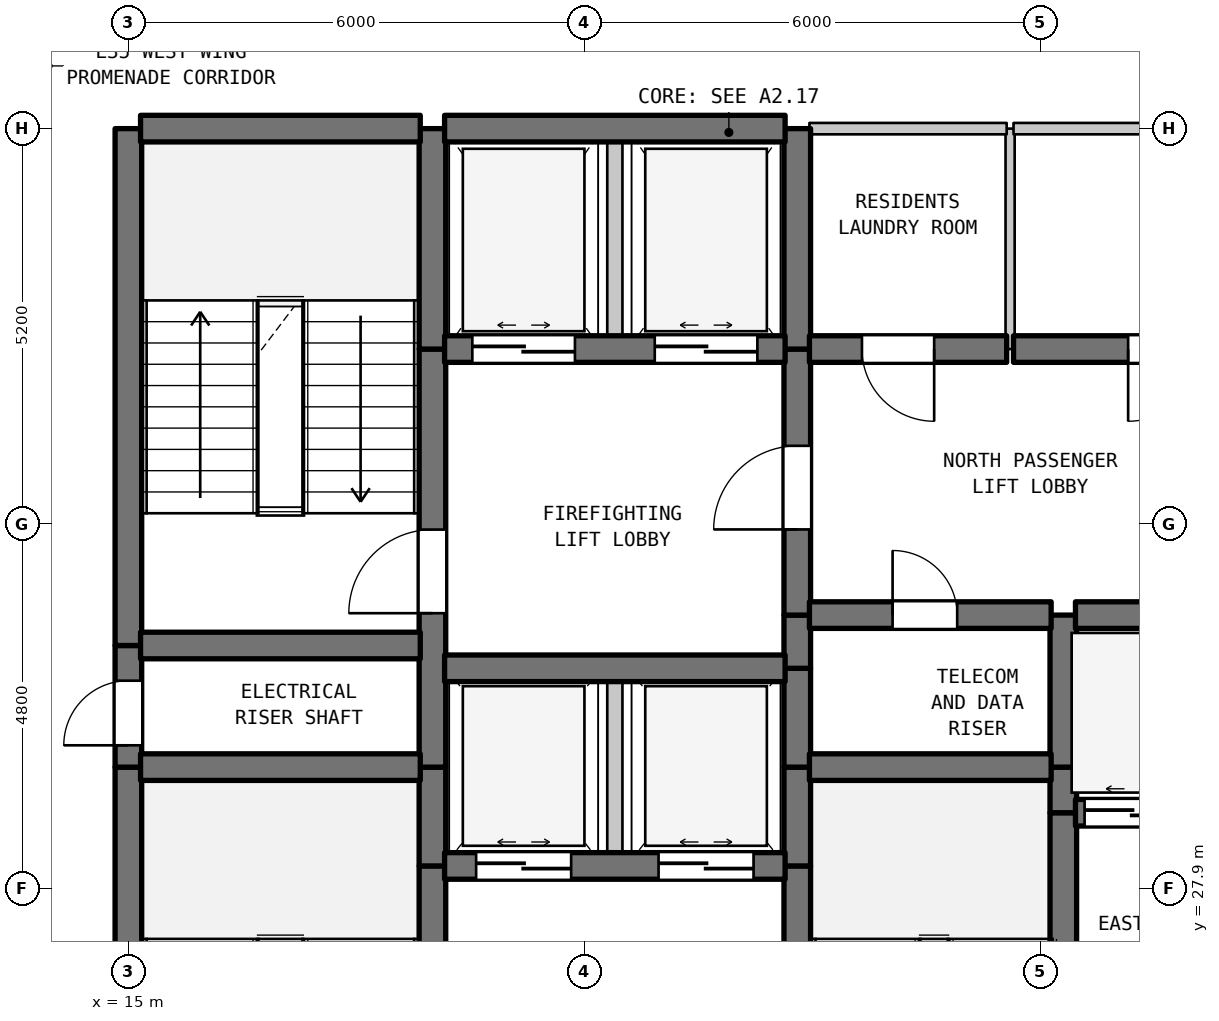
"""IFC4 building model, lengths in metres.
Left out: names, types, materials, properties, quantities, classifications, styles, units other than length and angle.
Written with IfcOpenShell. Run it as: python <this file> out.ifc"""

import sys

from ifc_helpers import new_model, si_unit, direction, frame, frame_2d, origin, place, context, subcontext, project, spatial, rectangle, extrude, element, fill, save


model = new_model("IFC4")
c1 = context("Model", 3, precision=1e-05, world=origin(), true_north=direction((0.0, 1.0)))
c2 = subcontext(c1, "Body", "Model", "MODEL_VIEW")
j1 = project(units=[si_unit("LENGTHUNIT", "METRE"), si_unit("PLANEANGLEUNIT", "RADIAN")], contexts=[c1])
p1 = place(None, origin())
s1 = spatial("IfcSite", under=j1, at=p1, CompositionType="ELEMENT")
p2 = place(p1, origin())
s2 = spatial("IfcBuilding", under=s1, at=p2, CompositionType="ELEMENT")
p3 = place(p2, frame((0.0, 0.0, 144.6)))
s3 = spatial("IfcBuildingStorey", under=s2, at=p3, CompositionType="ELEMENT", Elevation=144.6)
p4 = place(p3, frame((15.0, 22.7, 0.0), z_axis=(0.0, 0.0, 1.0), x_axis=(0.0, 1.0, 0.0)))
e1 = element("IfcWall", 1, at=p4, inside=s3, PredefinedType="SHEAR", context=c2, shape_type="SweptSolid", body=[
    extrude(rectangle(XDim=6.8, YDim=0.35, at=frame_2d((3.4, 0.0))), origin(), (0.0, 0.0, 1.0), 3.385),
])
p5 = place(p3, frame((15.0, 29.5, 0.0), z_axis=(0.0, 0.0, 1.0), x_axis=(0.0, 1.0, 0.0)))
e2 = element("IfcWall", 2, at=p5, inside=s3, PredefinedType="SHEAR", context=c2, shape_type="SweptSolid", body=[
    extrude(rectangle(XDim=1.6, YDim=0.35, at=frame_2d((0.8, 0.0))), origin(), (0.0, 0.0, 1.0), 3.385),
])
p6 = place(p5, frame((0.287, 0.0, 0.0)))
e3 = element("IfcOpeningElement", 3, at=p6, cuts=e2, PredefinedType="OPENING", context=c2, shape_type="SweptSolid", body=[
    extrude(rectangle(XDim=0.85, YDim=2.1, at=frame_2d((0.425, 1.05))), frame((0.0, 0.185, 0.0), z_axis=(0.0, -1.0, 0.0), x_axis=(1.0, 0.0, 0.0)), (0.0, 0.0, 1.0), 0.37),
])
p7 = place(p3, frame((15.0, 31.1, 0.0), z_axis=(0.0, 0.0, 1.0), x_axis=(0.0, 1.0, 0.0)))
e4 = element("IfcWall", 4, at=p7, inside=s3, PredefinedType="SHEAR", context=c2, shape_type="SweptSolid", body=[
    extrude(rectangle(XDim=6.8, YDim=0.35, at=frame_2d((3.4, 0.0))), origin(), (0.0, 0.0, 1.0), 3.385),
])
p8 = place(p3, frame((19.0, 22.7, 0.0), z_axis=(0.0, 0.0, 1.0), x_axis=(0.0, 1.0, 0.0)))
e5 = element("IfcWall", 5, at=p8, inside=s3, PredefinedType="SHEAR", context=c2, shape_type="SweptSolid", body=[
    extrude(rectangle(XDim=5.5, YDim=0.35, at=frame_2d((2.75, 0.0))), origin(), (0.0, 0.0, 1.0), 3.385),
])
p9 = place(p8, frame((0.631, 0.0, 0.0)))
e6 = element("IfcOpeningElement", 6, at=p9, cuts=e5, PredefinedType="OPENING", context=c2, shape_type="SweptSolid", body=[
    extrude(rectangle(XDim=1.1, YDim=2.15, at=frame_2d((0.55, 1.075))), frame((0.0, 0.185, 0.0), z_axis=(0.0, -1.0, 0.0), x_axis=(1.0, 0.0, 0.0)), (0.0, 0.0, 1.0), 0.37),
])
p10 = place(p3, frame((19.0, 28.2, 0.0), z_axis=(0.0, 0.0, 1.0), x_axis=(0.0, 1.0, 0.0)))
e7 = element("IfcWall", 7, at=p10, inside=s3, PredefinedType="SHEAR", context=c2, shape_type="SweptSolid", body=[
    extrude(rectangle(XDim=1.3, YDim=0.35, at=frame_2d((0.65, 0.0))), origin(), (0.0, 0.0, 1.0), 3.385),
])
p11 = place(p3, frame((19.0, 29.5, 0.0), z_axis=(0.0, 0.0, 1.0), x_axis=(0.0, 1.0, 0.0)))
e8 = element("IfcWall", 8, at=p11, inside=s3, PredefinedType="SHEAR", context=c2, shape_type="SweptSolid", body=[
    extrude(rectangle(XDim=5.5, YDim=0.35, at=frame_2d((2.75, 0.0))), origin(), (0.0, 0.0, 1.0), 3.385),
])
p12 = place(p11, frame((2.025, 0.0, 0.0)))
e9 = element("IfcOpeningElement", 9, at=p12, cuts=e8, PredefinedType="OPENING", context=c2, shape_type="SweptSolid", body=[
    extrude(rectangle(XDim=1.1, YDim=2.15, at=frame_2d((0.55, 1.075))), frame((0.0, 0.185, 0.0), z_axis=(0.0, -1.0, 0.0), x_axis=(1.0, 0.0, 0.0)), (0.0, 0.0, 1.0), 0.37),
])
p13 = place(p3, frame((19.0, 35.0, 0.0), z_axis=(0.0, 0.0, 1.0), x_axis=(0.0, 1.0, 0.0)))
e10 = element("IfcWall", 10, at=p13, inside=s3, PredefinedType="SHEAR", context=c2, shape_type="SweptSolid", body=[
    extrude(rectangle(XDim=2.9, YDim=0.35, at=frame_2d((1.45, 0.0))), origin(), (0.0, 0.0, 1.0), 3.385),
])
p14 = place(p3, frame((21.4, 28.2, 0.0), z_axis=(0.0, 0.0, 1.0), x_axis=(0.0, 1.0, 0.0)))
e11 = element("IfcWall", 11, at=p14, inside=s3, PredefinedType="STANDARD", context=c2, shape_type="SweptSolid", body=[
    extrude(rectangle(XDim=2.6, YDim=0.2, at=frame_2d((1.3, 0.0))), origin(), (0.0, 0.0, 1.0), 3.385),
])
p15 = place(p3, frame((21.4, 35.0, 0.0), z_axis=(0.0, 0.0, 1.0), x_axis=(0.0, 1.0, 0.0)))
e12 = element("IfcWall", 12, at=p15, inside=s3, PredefinedType="STANDARD", context=c2, shape_type="SweptSolid", body=[
    extrude(rectangle(XDim=2.9, YDim=0.2, at=frame_2d((1.45, 0.0))), origin(), (0.0, 0.0, 1.0), 3.385),
])
p16 = place(p3, frame((23.8, 22.7, 0.0), z_axis=(0.0, 0.0, 1.0), x_axis=(0.0, 1.0, 0.0)))
e13 = element("IfcWall", 13, at=p16, inside=s3, PredefinedType="SHEAR", context=c2, shape_type="SweptSolid", body=[
    extrude(rectangle(XDim=5.5, YDim=0.35, at=frame_2d((2.75, 0.0))), origin(), (0.0, 0.0, 1.0), 3.385),
])
p17 = place(p16, frame((0.235, 0.0, 0.0)))
e14 = element("IfcOpeningElement", 14, at=p17, cuts=e13, PredefinedType="OPENING", context=c2, shape_type="SweptSolid", body=[
    extrude(rectangle(XDim=1.1, YDim=2.15, at=frame_2d((0.55, 1.075))), frame((0.0, 0.185, 0.0), z_axis=(0.0, -1.0, 0.0), x_axis=(1.0, 0.0, 0.0)), (0.0, 0.0, 1.0), 0.37),
])
for number, where, z_axis, x_axis in (
    (15, (23.8, 28.2, 0.0), (0.0, 0.0, 1.0), (0.0, 1.0, 0.0)),
    (16, (23.8, 29.5, 0.0), (0.0, 0.0, 1.0), (0.0, 1.0, 0.0)),
):
    element("IfcWall", number, at=place(p3, frame(where, z_axis=z_axis, x_axis=x_axis)), inside=s3, PredefinedType="SHEAR", context=c2, shape_type="SweptSolid", body=[
        extrude(rectangle(XDim=1.3, YDim=0.35, at=frame_2d((0.65, 0.0))), origin(), (0.0, 0.0, 1.0), 3.385),
    ])
p18 = place(p3, frame((23.8, 30.8, 0.0), z_axis=(0.0, 0.0, 1.0), x_axis=(0.0, 1.0, 0.0)))
e17 = element("IfcWall", 17, at=p18, inside=s3, PredefinedType="SHEAR", context=c2, shape_type="SweptSolid", body=[
    extrude(rectangle(XDim=0.7, YDim=0.35, at=frame_2d((0.35, 0.0))), origin(), (0.0, 0.0, 1.0), 3.385),
])
p19 = place(p3, frame((23.8, 31.5, 0.0), z_axis=(0.0, 0.0, 1.0), x_axis=(0.0, 1.0, 0.0)))
e18 = element("IfcWall", 18, at=p19, inside=s3, PredefinedType="SHEAR", context=c2, shape_type="SweptSolid", body=[
    extrude(rectangle(XDim=3.5, YDim=0.35, at=frame_2d((1.75, 0.0))), origin(), (0.0, 0.0, 1.0), 3.385),
])
p20 = place(p19, frame((1.127, 0.0, 0.0)))
e19 = element("IfcOpeningElement", 19, at=p20, cuts=e18, PredefinedType="OPENING", context=c2, shape_type="SweptSolid", body=[
    extrude(rectangle(XDim=1.1, YDim=2.15, at=frame_2d((0.55, 1.075))), frame((0.0, 0.185, 0.0), z_axis=(0.0, -1.0, 0.0), x_axis=(1.0, 0.0, 0.0)), (0.0, 0.0, 1.0), 0.37),
])
p21 = place(p3, frame((23.8, 35.0, 0.0), z_axis=(0.0, 0.0, 1.0), x_axis=(0.0, 1.0, 0.0)))
e20 = element("IfcWall", 20, at=p21, inside=s3, PredefinedType="SHEAR", context=c2, shape_type="SweptSolid", body=[
    extrude(rectangle(XDim=2.9, YDim=0.35, at=frame_2d((1.45, 0.0))), origin(), (0.0, 0.0, 1.0), 3.385),
])
p22 = place(p3, frame((26.6, 35.0, 0.0), z_axis=(0.0, 0.0, 1.0), x_axis=(0.0, 1.0, 0.0)))
e21 = element("IfcWall", 21, at=p22, inside=s3, PredefinedType="PARTITIONING", context=c2, shape_type="SweptSolid", body=[
    extrude(rectangle(XDim=2.9, YDim=0.12, at=frame_2d((1.45, 0.0))), origin(), (0.0, 0.0, 1.0), 3.385),
])
p23 = place(p3, frame((27.3, 25.6, 0.0), z_axis=(0.0, 0.0, 1.0), x_axis=(0.0, 1.0, 0.0)))
e22 = element("IfcWall", 22, at=p23, inside=s3, PredefinedType="SHEAR", context=c2, shape_type="SweptSolid", body=[
    extrude(rectangle(XDim=3.3, YDim=0.35, at=frame_2d((1.65, 0.0))), origin(), (0.0, 0.0, 1.0), 3.385),
])
p24 = place(p3, frame((27.3, 28.9, 0.0), z_axis=(0.0, 0.0, 1.0), x_axis=(0.0, 1.0, 0.0)))
e23 = element("IfcWall", 23, at=p24, inside=s3, PredefinedType="SHEAR", context=c2, shape_type="SweptSolid", body=[
    extrude(rectangle(XDim=0.6, YDim=0.35, at=frame_2d((0.3, 0.0))), origin(), (0.0, 0.0, 1.0), 3.385),
])
p25 = place(p3, frame((27.3, 29.5, 0.0), z_axis=(0.0, 0.0, 1.0), x_axis=(0.0, 1.0, 0.0)))
e24 = element("IfcWall", 24, at=p25, inside=s3, PredefinedType="SHEAR", context=c2, shape_type="SweptSolid", body=[
    extrude(rectangle(XDim=2.0, YDim=0.35, at=frame_2d((1.0, 0.0))), origin(), (0.0, 0.0, 1.0), 3.385),
])
p26 = place(p3, frame((19.16, 28.2, 0.0), z_axis=(0.0, 0.0, 1.0), x_axis=(1.0, 0.0, 0.0)))
e25 = element("IfcWall", 25, at=p26, inside=s3, PredefinedType="SHEAR", context=c2, shape_type="SweptSolid", body=[
    extrude(rectangle(XDim=4.48, YDim=0.35, at=frame_2d((2.24, 0.0))), origin(), (0.0, 0.0, 1.0), 3.385),
])
p27 = place(p26, frame((0.415, 0.0, 0.0)))
e26 = element("IfcOpeningElement", 26, at=p27, cuts=e25, PredefinedType="OPENING", context=c2, shape_type="SweptSolid", body=[
    extrude(rectangle(XDim=1.25, YDim=2.2, at=frame_2d((0.625, 1.1))), frame((0.0, 0.185, 0.0), z_axis=(0.0, -1.0, 0.0), x_axis=(1.0, 0.0, 0.0)), (0.0, 0.0, 1.0), 0.37),
])
p28 = place(p26, frame((2.815, 0.0, 0.0)))
e27 = element("IfcOpeningElement", 27, at=p28, cuts=e25, PredefinedType="OPENING", context=c2, shape_type="SweptSolid", body=[
    extrude(rectangle(XDim=1.25, YDim=2.2, at=frame_2d((0.625, 1.1))), frame((0.0, 0.185, 0.0), z_axis=(0.0, -1.0, 0.0), x_axis=(1.0, 0.0, 0.0)), (0.0, 0.0, 1.0), 0.37),
])
p29 = place(p3, frame((27.46, 28.9, 0.0), z_axis=(0.0, 0.0, 1.0), x_axis=(1.0, 0.0, 0.0)))
e28 = element("IfcWall", 28, at=p29, inside=s3, PredefinedType="SHEAR", context=c2, shape_type="SweptSolid", body=[
    extrude(rectangle(XDim=3.18, YDim=0.35, at=frame_2d((1.59, 0.0))), origin(), (0.0, 0.0, 1.0), 3.385),
])
p30 = place(p29, frame((0.12, 0.0, 0.0)))
e29 = element("IfcOpeningElement", 29, at=p30, cuts=e28, PredefinedType="OPENING", context=c2, shape_type="SweptSolid", body=[
    extrude(rectangle(XDim=1.25, YDim=2.2, at=frame_2d((0.625, 1.1))), frame((0.0, 0.185, 0.0), z_axis=(0.0, -1.0, 0.0), x_axis=(1.0, 0.0, 0.0)), (0.0, 0.0, 1.0), 0.37),
])
p31 = place(p29, frame((1.81, 0.0, 0.0)))
e30 = element("IfcOpeningElement", 30, at=p31, cuts=e28, PredefinedType="OPENING", context=c2, shape_type="SweptSolid", body=[
    extrude(rectangle(XDim=1.25, YDim=2.2, at=frame_2d((0.625, 1.1))), frame((0.0, 0.185, 0.0), z_axis=(0.0, -1.0, 0.0), x_axis=(1.0, 0.0, 0.0)), (0.0, 0.0, 1.0), 0.37),
])
p32 = place(p3, frame((15.16, 29.5, 0.0), z_axis=(0.0, 0.0, 1.0), x_axis=(1.0, 0.0, 0.0)))
e31 = element("IfcWall", 31, at=p32, inside=s3, PredefinedType="SHEAR", context=c2, shape_type="SweptSolid", body=[
    extrude(rectangle(XDim=3.68, YDim=0.35, at=frame_2d((1.84, 0.0))), origin(), (0.0, 0.0, 1.0), 3.385),
])
p33 = place(p3, frame((23.96, 29.5, 0.0), z_axis=(0.0, 0.0, 1.0), x_axis=(1.0, 0.0, 0.0)))
e32 = element("IfcWall", 32, at=p33, inside=s3, PredefinedType="SHEAR", context=c2, shape_type="SweptSolid", body=[
    extrude(rectangle(XDim=3.18, YDim=0.35, at=frame_2d((1.59, 0.0))), origin(), (0.0, 0.0, 1.0), 3.385),
])
p34 = place(p3, frame((19.16, 30.8, 0.0), z_axis=(0.0, 0.0, 1.0), x_axis=(1.0, 0.0, 0.0)))
e33 = element("IfcWall", 33, at=p34, inside=s3, PredefinedType="SHEAR", context=c2, shape_type="SweptSolid", body=[
    extrude(rectangle(XDim=4.48, YDim=0.35, at=frame_2d((2.24, 0.0))), origin(), (0.0, 0.0, 1.0), 3.385),
])
p35 = place(p3, frame((15.16, 31.1, 0.0), z_axis=(0.0, 0.0, 1.0), x_axis=(1.0, 0.0, 0.0)))
e34 = element("IfcWall", 34, at=p35, inside=s3, PredefinedType="SHEAR", context=c2, shape_type="SweptSolid", body=[
    extrude(rectangle(XDim=3.68, YDim=0.35, at=frame_2d((1.84, 0.0))), origin(), (0.0, 0.0, 1.0), 3.385),
])
p36 = place(p3, frame((23.96, 31.5, 0.0), z_axis=(0.0, 0.0, 1.0), x_axis=(1.0, 0.0, 0.0)))
e35 = element("IfcWall", 35, at=p36, inside=s3, PredefinedType="SHEAR", context=c2, shape_type="SweptSolid", body=[
    extrude(rectangle(XDim=3.18, YDim=0.35, at=frame_2d((1.59, 0.0))), origin(), (0.0, 0.0, 1.0), 3.385),
])
p37 = place(p36, frame((1.094, 0.0, 0.0)))
e36 = element("IfcOpeningElement", 36, at=p37, cuts=e35, PredefinedType="OPENING", context=c2, shape_type="SweptSolid", body=[
    extrude(rectangle(XDim=0.85, YDim=2.1, at=frame_2d((0.425, 1.05))), frame((0.0, 0.185, 0.0), z_axis=(0.0, -1.0, 0.0), x_axis=(1.0, 0.0, 0.0)), (0.0, 0.0, 1.0), 0.37),
])
p38 = place(p3, frame((27.46, 31.5, 0.0), z_axis=(0.0, 0.0, 1.0), x_axis=(1.0, 0.0, 0.0)))
e37 = element("IfcWall", 37, at=p38, inside=s3, PredefinedType="SHEAR", context=c2, shape_type="SweptSolid", body=[
    extrude(rectangle(XDim=3.18, YDim=0.35, at=frame_2d((1.59, 0.0))), origin(), (0.0, 0.0, 1.0), 3.385),
])
p39 = place(p3, frame((19.16, 35.0, 0.0), z_axis=(0.0, 0.0, 1.0), x_axis=(1.0, 0.0, 0.0)))
e38 = element("IfcWall", 38, at=p39, inside=s3, PredefinedType="SHEAR", context=c2, shape_type="SweptSolid", body=[
    extrude(rectangle(XDim=4.48, YDim=0.35, at=frame_2d((2.24, 0.0))), origin(), (0.0, 0.0, 1.0), 3.385),
])
p40 = place(p39, frame((0.365, 0.0, 0.0)))
e39 = element("IfcOpeningElement", 39, at=p40, cuts=e38, PredefinedType="OPENING", context=c2, shape_type="SweptSolid", body=[
    extrude(rectangle(XDim=1.35, YDim=2.2, at=frame_2d((0.675, 1.1))), frame((0.0, 0.185, 0.0), z_axis=(0.0, -1.0, 0.0), x_axis=(1.0, 0.0, 0.0)), (0.0, 0.0, 1.0), 0.37),
])
p41 = place(p39, frame((2.765, 0.0, 0.0)))
e40 = element("IfcOpeningElement", 40, at=p41, cuts=e38, PredefinedType="OPENING", context=c2, shape_type="SweptSolid", body=[
    extrude(rectangle(XDim=1.35, YDim=2.2, at=frame_2d((0.675, 1.1))), frame((0.0, 0.185, 0.0), z_axis=(0.0, -1.0, 0.0), x_axis=(1.0, 0.0, 0.0)), (0.0, 0.0, 1.0), 0.37),
])
p42 = place(p3, frame((23.96, 35.0, 0.0), z_axis=(0.0, 0.0, 1.0), x_axis=(1.0, 0.0, 0.0)))
e41 = element("IfcWall", 41, at=p42, inside=s3, PredefinedType="SHEAR", context=c2, shape_type="SweptSolid", body=[
    extrude(rectangle(XDim=2.595, YDim=0.35, at=frame_2d((1.297, 0.0))), origin(), (0.0, 0.0, 1.0), 3.385),
])
p43 = place(p42, frame((0.691, 0.0, 0.0)))
e42 = element("IfcOpeningElement", 42, at=p43, cuts=e41, PredefinedType="OPENING", context=c2, shape_type="SweptSolid", body=[
    extrude(rectangle(XDim=0.95, YDim=2.15, at=frame_2d((0.475, 1.075))), frame((0.0, 0.185, 0.0), z_axis=(0.0, -1.0, 0.0), x_axis=(1.0, 0.0, 0.0)), (0.0, 0.0, 1.0), 0.37),
])
p44 = place(p3, frame((26.645, 35.0, 0.0), z_axis=(0.0, 0.0, 1.0), x_axis=(1.0, 0.0, 0.0)))
e43 = element("IfcWall", 43, at=p44, inside=s3, PredefinedType="SHEAR", context=c2, shape_type="SweptSolid", body=[
    extrude(rectangle(XDim=3.995, YDim=0.35, at=frame_2d((1.998, 0.0))), origin(), (0.0, 0.0, 1.0), 3.385),
])
p45 = place(p44, frame((1.508, 0.0, 0.0)))
e44 = element("IfcOpeningElement", 44, at=p45, cuts=e43, PredefinedType="OPENING", context=c2, shape_type="SweptSolid", body=[
    extrude(rectangle(XDim=0.95, YDim=2.15, at=frame_2d((0.475, 1.075))), frame((0.0, 0.185, 0.0), z_axis=(0.0, -1.0, 0.0), x_axis=(1.0, 0.0, 0.0)), (0.0, 0.0, 1.0), 0.37),
])
p46 = place(p3, frame((15.16, 37.9, 0.0), z_axis=(0.0, 0.0, 1.0), x_axis=(1.0, 0.0, 0.0)))
e45 = element("IfcWall", 45, at=p46, inside=s3, PredefinedType="SHEAR", context=c2, shape_type="SweptSolid", body=[
    extrude(rectangle(XDim=3.68, YDim=0.35, at=frame_2d((1.84, 0.0))), origin(), (0.0, 0.0, 1.0), 3.385),
])
p47 = place(p3, frame((19.16, 37.9, 0.0), z_axis=(0.0, 0.0, 1.0), x_axis=(1.0, 0.0, 0.0)))
e46 = element("IfcWall", 46, at=p47, inside=s3, PredefinedType="SHEAR", context=c2, shape_type="SweptSolid", body=[
    extrude(rectangle(XDim=4.48, YDim=0.35, at=frame_2d((2.24, 0.0))), origin(), (0.0, 0.0, 1.0), 3.385),
])
p48 = place(p3, frame((23.96, 37.9, 0.0), z_axis=(0.0, 0.0, 1.0), x_axis=(1.0, 0.0, 0.0)))
e47 = element("IfcWall", 47, at=p48, inside=s3, PredefinedType="STANDARD", context=c2, shape_type="SweptSolid", body=[
    extrude(rectangle(XDim=2.595, YDim=0.15, at=frame_2d((1.297, 0.0))), origin(), (0.0, 0.0, 1.0), 2.885),
])
p49 = place(p3, frame((26.645, 37.9, 0.0), z_axis=(0.0, 0.0, 1.0), x_axis=(1.0, 0.0, 0.0)))
e48 = element("IfcWall", 48, at=p49, inside=s3, PredefinedType="STANDARD", context=c2, shape_type="SweptSolid", body=[
    extrude(rectangle(XDim=4.095, YDim=0.15, at=frame_2d((2.047, 0.0))), origin(), (0.0, 0.0, 1.0), 2.885),
])
p50 = place(p6, origin())
e49 = element("IfcDoor", 49, at=p50, inside=s3, OperationType="SINGLE_SWING_LEFT", PredefinedType="DOOR", context=c2, shape_type="SweptSolid", body=[
    extrude(rectangle(XDim=0.85, YDim=2.1, at=frame_2d((0.425, 1.05))), frame((0.0, 0.025, 0.0), z_axis=(0.0, -1.0, 0.0), x_axis=(1.0, 0.0, 0.0)), (0.0, 0.0, 1.0), 0.05),
])
fill(e3, e49)
p51 = place(p12, origin())
e50 = element("IfcDoor", 50, at=p51, inside=s3, OperationType="SINGLE_SWING_LEFT", PredefinedType="DOOR", context=c2, shape_type="SweptSolid", body=[
    extrude(rectangle(XDim=1.1, YDim=2.15, at=frame_2d((0.55, 1.075))), frame((0.0, 0.025, 0.0), z_axis=(0.0, -1.0, 0.0), x_axis=(1.0, 0.0, 0.0)), (0.0, 0.0, 1.0), 0.05),
])
fill(e9, e50)
p52 = place(p20, origin())
e51 = element("IfcDoor", 51, at=p52, inside=s3, OperationType="SINGLE_SWING_LEFT", PredefinedType="DOOR", context=c2, shape_type="SweptSolid", body=[
    extrude(rectangle(XDim=1.1, YDim=2.15, at=frame_2d((0.55, 1.075))), frame((0.0, 0.025, 0.0), z_axis=(0.0, -1.0, 0.0), x_axis=(1.0, 0.0, 0.0)), (0.0, 0.0, 1.0), 0.05),
])
fill(e19, e51)
p53 = place(p27, origin())
e52 = element("IfcDoor", 52, at=p53, inside=s3, OperationType="DOUBLE_DOOR_SLIDING", PredefinedType="DOOR", context=c2, shape_type="SweptSolid", body=[
    extrude(rectangle(XDim=1.25, YDim=2.2, at=frame_2d((0.625, 1.1))), frame((0.0, 0.025, 0.0), z_axis=(0.0, -1.0, 0.0), x_axis=(1.0, 0.0, 0.0)), (0.0, 0.0, 1.0), 0.05),
])
fill(e26, e52)
p54 = place(p28, origin())
e53 = element("IfcDoor", 53, at=p54, inside=s3, OperationType="DOUBLE_DOOR_SLIDING", PredefinedType="DOOR", context=c2, shape_type="SweptSolid", body=[
    extrude(rectangle(XDim=1.25, YDim=2.2, at=frame_2d((0.625, 1.1))), frame((0.0, 0.025, 0.0), z_axis=(0.0, -1.0, 0.0), x_axis=(1.0, 0.0, 0.0)), (0.0, 0.0, 1.0), 0.05),
])
fill(e27, e53)
p55 = place(p30, origin())
e54 = element("IfcDoor", 54, at=p55, inside=s3, OperationType="DOUBLE_DOOR_SLIDING", PredefinedType="DOOR", context=c2, shape_type="SweptSolid", body=[
    extrude(rectangle(XDim=1.25, YDim=2.2, at=frame_2d((0.625, 1.1))), frame((0.0, 0.025, 0.0), z_axis=(0.0, -1.0, 0.0), x_axis=(1.0, 0.0, 0.0)), (0.0, 0.0, 1.0), 0.05),
])
fill(e29, e54)
p56 = place(p37, origin())
e55 = element("IfcDoor", 55, at=p56, inside=s3, OperationType="SINGLE_SWING_LEFT", PredefinedType="DOOR", context=c2, shape_type="SweptSolid", body=[
    extrude(rectangle(XDim=0.85, YDim=2.1, at=frame_2d((0.425, 1.05))), frame((0.0, 0.025, 0.0), z_axis=(0.0, -1.0, 0.0), x_axis=(1.0, 0.0, 0.0)), (0.0, 0.0, 1.0), 0.05),
])
fill(e36, e55)
p57 = place(p40, origin())
e56 = element("IfcDoor", 56, at=p57, inside=s3, OperationType="DOUBLE_DOOR_SLIDING", PredefinedType="DOOR", context=c2, shape_type="SweptSolid", body=[
    extrude(rectangle(XDim=1.35, YDim=2.2, at=frame_2d((0.675, 1.1))), frame((0.0, 0.025, 0.0), z_axis=(0.0, -1.0, 0.0), x_axis=(1.0, 0.0, 0.0)), (0.0, 0.0, 1.0), 0.05),
])
fill(e39, e56)
p58 = place(p41, origin())
e57 = element("IfcDoor", 57, at=p58, inside=s3, OperationType="DOUBLE_DOOR_SLIDING", PredefinedType="DOOR", context=c2, shape_type="SweptSolid", body=[
    extrude(rectangle(XDim=1.35, YDim=2.2, at=frame_2d((0.675, 1.1))), frame((0.0, 0.025, 0.0), z_axis=(0.0, -1.0, 0.0), x_axis=(1.0, 0.0, 0.0)), (0.0, 0.0, 1.0), 0.05),
])
fill(e40, e57)
p59 = place(p43, frame((0.95, 0.0, 0.0), z_axis=(0.0, 0.0, 1.0), x_axis=(-1.0, 0.0, 0.0)))
e58 = element("IfcDoor", 58, at=p59, inside=s3, OperationType="SINGLE_SWING_RIGHT", PredefinedType="DOOR", context=c2, shape_type="SweptSolid", body=[
    extrude(rectangle(XDim=0.95, YDim=2.15, at=frame_2d((0.475, 1.075))), frame((0.0, 0.025, 0.0), z_axis=(0.0, -1.0, 0.0), x_axis=(1.0, 0.0, 0.0)), (0.0, 0.0, 1.0), 0.05),
])
fill(e42, e58)
p60 = place(p45, frame((0.95, 0.0, 0.0), z_axis=(0.0, 0.0, 1.0), x_axis=(-1.0, 0.0, 0.0)))
e59 = element("IfcDoor", 59, at=p60, inside=s3, OperationType="SINGLE_SWING_LEFT", PredefinedType="DOOR", context=c2, shape_type="SweptSolid", body=[
    extrude(rectangle(XDim=0.95, YDim=2.15, at=frame_2d((0.475, 1.075))), frame((0.0, 0.025, 0.0), z_axis=(0.0, -1.0, 0.0), x_axis=(1.0, 0.0, 0.0)), (0.0, 0.0, 1.0), 0.05),
])
fill(e44, e59)
save(model, sys.argv[1])
